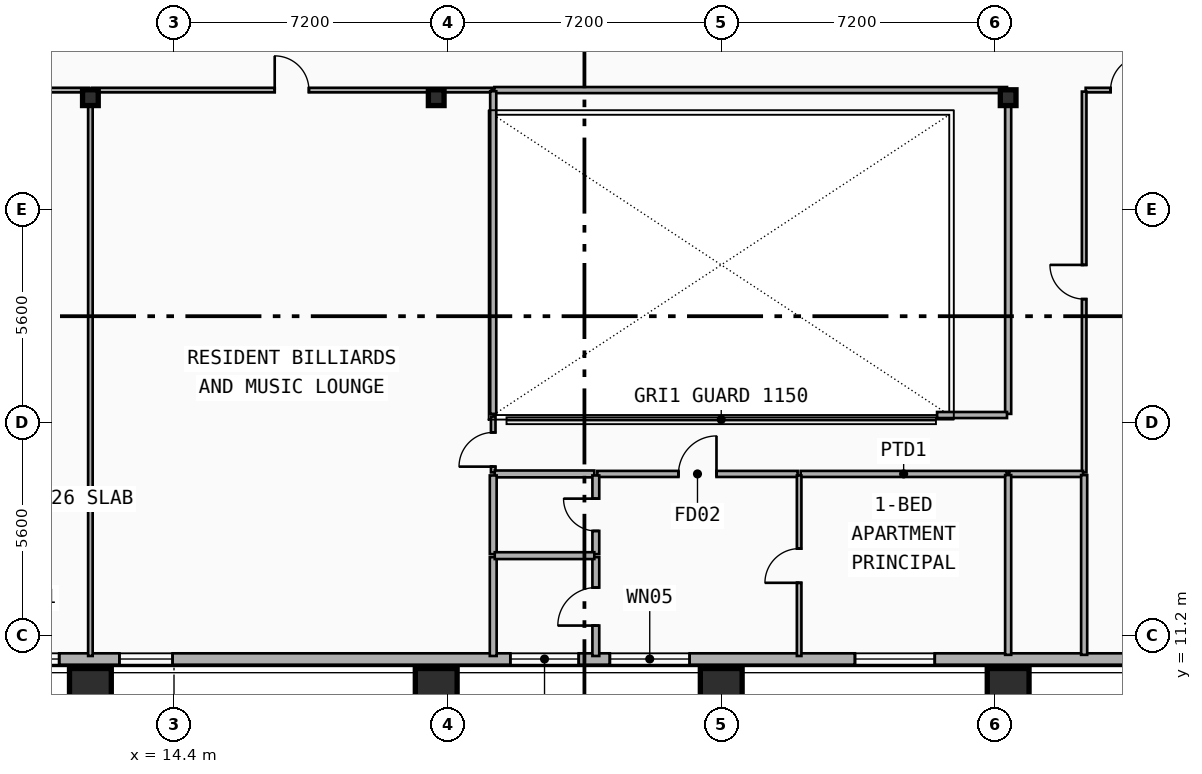
"""IFC4 building model, lengths in metres.
Left out: names, types, materials, properties, quantities, classifications, styles, units other than length and angle.
Written with IfcOpenShell. Run it as: python <this file> out.ifc"""

import sys

from ifc_helpers import new_model, si_unit, direction, frame, frame_2d, origin, origin_2d, place, context, subcontext, project, spatial, rectangle, i_section, extrude, element, fill, save


model = new_model("IFC4")
c1 = context("Model", 3, precision=1e-05, world=origin(), true_north=direction((0.0, 1.0)))
c2 = subcontext(c1, "Body", "Model", "MODEL_VIEW")
j1 = project(units=[si_unit("LENGTHUNIT", "METRE"), si_unit("PLANEANGLEUNIT", "RADIAN")], contexts=[c1])
p1 = place(None, origin())
s1 = spatial("IfcSite", under=j1, at=p1, CompositionType="ELEMENT")
p2 = place(p1, origin())
s2 = spatial("IfcBuilding", under=s1, at=p2, CompositionType="ELEMENT")
p3 = place(p2, frame((0.0, 0.0, 180.3)))
s3 = spatial("IfcBuildingStorey", under=s2, at=p3, CompositionType="ELEMENT", Elevation=180.3)
for number, where, z_axis, x_axis in (
    (1, (12.2, 25.35, 0.0), (0.0, 0.0, 1.0), (1.0, 0.0, 0.0)),
    (2, (21.3, 25.35, 0.0), (0.0, 0.0, 1.0), (1.0, 0.0, 0.0)),
    (3, (36.35, 25.35, 0.0), (0.0, 0.0, 1.0), (1.0, 0.0, 0.0)),
):
    element("IfcColumn", number, at=place(p3, frame(where, z_axis=z_axis, x_axis=x_axis)), inside=s3, PredefinedType="COLUMN", context=c2, shape_type="SweptSolid", body=[
        extrude(i_section(OverallWidth=0.413, OverallDepth=0.415, WebThickness=0.03, FlangeThickness=0.047, FilletRadius=0.015, at=origin_2d()), origin(), (0.0, 0.0, 1.0), 3.55),
    ])
for number, where, z_axis, x_axis in (
    (4, (12.2, 9.889, 0.0), (0.0, -0.09, 0.996), (1.0, 0.0, 0.0)),
    (5, (21.3, 9.889, 0.0), (0.0, -0.09, 0.996), (1.0, 0.0, 0.0)),
    (6, (28.8, 9.889, 0.0), (0.0, -0.09, 0.996), (1.0, 0.0, 0.0)),
    (7, (36.35, 9.889, 0.0), (0.0, -0.09, 0.996), (1.0, 0.0, 0.0)),
):
    element("IfcColumn", number, at=place(p3, frame(where, z_axis=z_axis, x_axis=x_axis)), inside=s3, PredefinedType="COLUMN", context=c2, shape_type="SweptSolid", body=[
        extrude(rectangle(XDim=1.1, YDim=1.1, at=origin_2d()), origin(), (0.0, 0.0, 1.0), 3.565),
    ])
p4 = place(p3, frame((48.0, 10.58, 0.0), z_axis=(0.0, 0.0, 1.0), x_axis=(-1.0, 0.0, 0.0)))
e8 = element("IfcWall", 8, at=p4, inside=s3, PredefinedType="SOLIDWALL", context=c2, shape_type="SweptSolid", body=[
    extrude(rectangle(XDim=38.4, YDim=0.3, at=frame_2d((19.2, 0.0))), origin(), (0.0, 0.0, 1.0), 3.29),
])
p5 = place(p4, frame((36.621, 0.0, 0.75)))
e9 = element("IfcOpeningElement", 9, at=p5, cuts=e8, PredefinedType="OPENING", context=c2, shape_type="SweptSolid", body=[
    extrude(rectangle(XDim=1.4, YDim=1.8, at=frame_2d((0.7, 0.9))), frame((0.0, 0.16, 0.0), z_axis=(0.0, -1.0, 0.0), x_axis=(1.0, 0.0, 0.0)), (0.0, 0.0, 1.0), 0.32),
])
p6 = place(p4, frame((33.637, 0.0, 0.34)))
e10 = element("IfcOpeningElement", 10, at=p6, cuts=e8, PredefinedType="OPENING", context=c2, shape_type="SweptSolid", body=[
    extrude(rectangle(XDim=1.4, YDim=1.8, at=frame_2d((0.7, 0.9))), frame((0.0, 0.16, 0.0), z_axis=(0.0, -1.0, 0.0), x_axis=(1.0, 0.0, 0.0)), (0.0, 0.0, 1.0), 0.32),
])
p7 = place(p4, frame((20.031, 0.0, 0.65)))
e11 = element("IfcOpeningElement", 11, at=p7, cuts=e8, PredefinedType="OPENING", context=c2, shape_type="SweptSolid", body=[
    extrude(rectangle(XDim=2.1, YDim=2.1, at=frame_2d((1.05, 1.05))), frame((0.0, 0.16, 0.0), z_axis=(0.0, -1.0, 0.0), x_axis=(1.0, 0.0, 0.0)), (0.0, 0.0, 1.0), 0.32),
])
p8 = place(p4, frame((22.95, 0.0, 0.8)))
e12 = element("IfcOpeningElement", 12, at=p8, cuts=e8, PredefinedType="OPENING", context=c2, shape_type="SweptSolid", body=[
    extrude(rectangle(XDim=1.8, YDim=1.8, at=frame_2d((0.9, 0.9))), frame((0.0, 0.16, 0.0), z_axis=(0.0, -1.0, 0.0), x_axis=(1.0, 0.0, 0.0)), (0.0, 0.0, 1.0), 0.32),
])
p9 = place(p4, frame((13.581, 0.0, 0.65)))
e13 = element("IfcOpeningElement", 13, at=p9, cuts=e8, PredefinedType="OPENING", context=c2, shape_type="SweptSolid", body=[
    extrude(rectangle(XDim=2.1, YDim=2.1, at=frame_2d((1.05, 1.05))), frame((0.0, 0.16, 0.0), z_axis=(0.0, -1.0, 0.0), x_axis=(1.0, 0.0, 0.0)), (0.0, 0.0, 1.0), 0.32),
])
p10 = place(p4, frame((3.363, 0.0, 1.05)))
e14 = element("IfcOpeningElement", 14, at=p10, cuts=e8, PredefinedType="OPENING", context=c2, shape_type="SweptSolid", body=[
    extrude(rectangle(XDim=1.2, YDim=1.5, at=frame_2d((0.6, 0.75))), frame((0.0, 0.16, 0.0), z_axis=(0.0, -1.0, 0.0), x_axis=(1.0, 0.0, 0.0)), (0.0, 0.0, 1.0), 0.32),
])
p11 = place(p3, frame((5.66, 25.55, 0.0), z_axis=(0.0, 0.0, 1.0), x_axis=(1.0, 0.0, 0.0)))
e15 = element("IfcWall", 15, at=p11, inside=s3, PredefinedType="PARTITIONING", context=c2, shape_type="SweptSolid", body=[
    extrude(rectangle(XDim=6.5, YDim=0.12, at=frame_2d((3.25, 0.0))), origin(), (0.0, 0.0, 1.0), 2.37),
])
p12 = place(p11, frame((2.8, 0.0, 0.0)))
e16 = element("IfcOpeningElement", 16, at=p12, cuts=e15, PredefinedType="OPENING", context=c2, shape_type="SweptSolid", body=[
    extrude(rectangle(XDim=0.9, YDim=2.1, at=frame_2d((0.45, 1.05))), frame((0.0, 0.07, 0.0), z_axis=(0.0, -1.0, 0.0), x_axis=(1.0, 0.0, 0.0)), (0.0, 0.0, 1.0), 0.14),
])
p13 = place(p3, frame((12.24, 25.55, 0.0), z_axis=(0.0, 0.0, 1.0), x_axis=(1.0, 0.0, 0.0)))
e17 = element("IfcWall", 17, at=p13, inside=s3, PredefinedType="PARTITIONING", context=c2, shape_type="SweptSolid", body=[
    extrude(rectangle(XDim=10.52, YDim=0.12, at=frame_2d((5.26, 0.0))), origin(), (0.0, 0.0, 1.0), 2.37),
])
p14 = place(p13, frame((4.81, 0.0, 0.0)))
e18 = element("IfcOpeningElement", 18, at=p14, cuts=e17, PredefinedType="OPENING", context=c2, shape_type="SweptSolid", body=[
    extrude(rectangle(XDim=0.9, YDim=2.1, at=frame_2d((0.45, 1.05))), frame((0.0, 0.07, 0.0), z_axis=(0.0, -1.0, 0.0), x_axis=(1.0, 0.0, 0.0)), (0.0, 0.0, 1.0), 0.14),
])
p15 = place(p3, frame((38.39, 25.55, 0.0), z_axis=(0.0, 0.0, 1.0), x_axis=(1.0, 0.0, 0.0)))
e19 = element("IfcWall", 19, at=p15, inside=s3, PredefinedType="PARTITIONING", context=c2, shape_type="SweptSolid", body=[
    extrude(rectangle(XDim=13.55, YDim=0.12, at=frame_2d((6.775, 0.0))), origin(), (0.0, 0.0, 1.0), 2.37),
])
p16 = place(p15, frame((0.656, 0.0, 0.0)))
e20 = element("IfcOpeningElement", 20, at=p16, cuts=e19, PredefinedType="OPENING", context=c2, shape_type="SweptSolid", body=[
    extrude(rectangle(XDim=0.9, YDim=2.1, at=frame_2d((0.45, 1.05))), frame((0.0, 0.07, 0.0), z_axis=(0.0, -1.0, 0.0), x_axis=(1.0, 0.0, 0.0)), (0.0, 0.0, 1.0), 0.14),
])
p17 = place(p3, frame((38.35, 15.49, 0.0), z_axis=(0.0, 0.0, 1.0), x_axis=(0.0, 1.0, 0.0)))
e21 = element("IfcWall", 21, at=p17, inside=s3, PredefinedType="PARTITIONING", context=c2, shape_type="SweptSolid", body=[
    extrude(rectangle(XDim=10.02, YDim=0.12, at=frame_2d((5.01, 0.0))), origin(), (0.0, 0.0, 1.0), 2.82),
])
p18 = place(p17, frame((4.56, 0.0, 0.0)))
e22 = element("IfcOpeningElement", 22, at=p18, cuts=e21, PredefinedType="OPENING", context=c2, shape_type="SweptSolid", body=[
    extrude(rectangle(XDim=0.9, YDim=2.1, at=frame_2d((0.45, 1.05))), frame((0.0, 0.07, 0.0), z_axis=(0.0, -1.0, 0.0), x_axis=(1.0, 0.0, 0.0)), (0.0, 0.0, 1.0), 0.14),
])
p19 = place(p3, frame((22.8, 15.49, 0.0), z_axis=(0.0, 0.0, 1.0), x_axis=(0.0, 1.0, 0.0)))
e23 = element("IfcWall", 23, at=p19, inside=s3, PredefinedType="PARTITIONING", context=c2, shape_type="SweptSolid", body=[
    extrude(rectangle(XDim=1.47, YDim=0.12, at=frame_2d((0.735, 0.0))), origin(), (0.0, 0.0, 1.0), 2.73),
])
p20 = place(p19, frame((0.152, 0.0, 0.0)))
e24 = element("IfcOpeningElement", 24, at=p20, cuts=e23, PredefinedType="OPENING", context=c2, shape_type="SweptSolid", body=[
    extrude(rectangle(XDim=0.9, YDim=2.1, at=frame_2d((0.45, 1.05))), frame((0.0, 0.07, 0.0), z_axis=(0.0, -1.0, 0.0), x_axis=(1.0, 0.0, 0.0)), (0.0, 0.0, 1.0), 0.14),
])
p21 = place(p3, frame((25.54, 15.45, 0.0), z_axis=(0.0, 0.0, 1.0), x_axis=(1.0, 0.0, 0.0)))
e25 = element("IfcWall", 25, at=p21, inside=s3, PredefinedType="PARTITIONING", context=c2, shape_type="SweptSolid", body=[
    extrude(rectangle(XDim=5.27, YDim=0.16, at=frame_2d((2.635, 0.0))), origin(), (0.0, 0.0, 1.0), 2.37),
])
p22 = place(p21, frame((2.135, 0.0, 0.0)))
e26 = element("IfcOpeningElement", 26, at=p22, cuts=e25, PredefinedType="OPENING", context=c2, shape_type="SweptSolid", body=[
    extrude(rectangle(XDim=1.0, YDim=2.15, at=frame_2d((0.5, 1.075))), frame((0.0, 0.09, 0.0), z_axis=(0.0, -1.0, 0.0), x_axis=(1.0, 0.0, 0.0)), (0.0, 0.0, 1.0), 0.18),
])
p23 = place(p3, frame((22.84, 15.45, 0.0), z_axis=(0.0, 0.0, 1.0), x_axis=(1.0, 0.0, 0.0)))
e27 = element("IfcWall", 27, at=p23, inside=s3, PredefinedType="PLUMBINGWALL", context=c2, shape_type="SweptSolid", body=[
    extrude(rectangle(XDim=2.62, YDim=0.18, at=frame_2d((1.31, 0.0))), origin(), (0.0, 0.0, 1.0), 3.29),
])
p24 = place(p3, frame((30.89, 15.45, 0.0), z_axis=(0.0, 0.0, 1.0), x_axis=(1.0, 0.0, 0.0)))
e28 = element("IfcWall", 28, at=p24, inside=s3, PredefinedType="PARTITIONING", context=c2, shape_type="SweptSolid", body=[
    extrude(rectangle(XDim=5.42, YDim=0.16, at=frame_2d((2.71, 0.0))), origin(), (0.0, 0.0, 1.0), 2.37),
])
p25 = place(p3, frame((12.2, 10.66, 0.0), z_axis=(0.0, 0.0, 1.0), x_axis=(0.0, 1.0, 0.0)))
e29 = element("IfcWall", 29, at=p25, inside=s3, PredefinedType="PARTITIONING", context=c2, shape_type="SweptSolid", body=[
    extrude(rectangle(XDim=14.85, YDim=0.12, at=frame_2d((7.425, 0.0))), origin(), (0.0, 0.0, 1.0), 2.37),
])
p26 = place(p3, frame((22.8, 10.66, 0.0), z_axis=(0.0, 0.0, 1.0), x_axis=(0.0, 1.0, 0.0)))
e30 = element("IfcWall", 30, at=p26, inside=s3, PredefinedType="PLUMBINGWALL", context=c2, shape_type="SweptSolid", body=[
    extrude(rectangle(XDim=2.6, YDim=0.18, at=frame_2d((1.3, 0.0))), origin(), (0.0, 0.0, 1.0), 2.97),
])
p27 = place(p3, frame((22.8, 13.34, 0.0), z_axis=(0.0, 0.0, 1.0), x_axis=(0.0, 1.0, 0.0)))
e31 = element("IfcWall", 31, at=p27, inside=s3, PredefinedType="PLUMBINGWALL", context=c2, shape_type="SweptSolid", body=[
    extrude(rectangle(XDim=2.07, YDim=0.18, at=frame_2d((1.035, 0.0))), origin(), (0.0, 0.0, 1.0), 2.97),
])
p28 = place(p3, frame((25.5, 10.66, 0.0), z_axis=(0.0, 0.0, 1.0), x_axis=(0.0, 1.0, 0.0)))
e32 = element("IfcWall", 32, at=p28, inside=s3, PredefinedType="PLUMBINGWALL", context=c2, shape_type="SweptSolid", body=[
    extrude(rectangle(XDim=2.6, YDim=0.18, at=frame_2d((1.3, 0.0))), origin(), (0.0, 0.0, 1.0), 2.97),
])
p29 = place(p28, frame((0.8, 0.0, 0.0)))
e33 = element("IfcOpeningElement", 33, at=p29, cuts=e32, PredefinedType="OPENING", context=c2, shape_type="SweptSolid", body=[
    extrude(rectangle(XDim=1.0, YDim=2.15, at=frame_2d((0.5, 1.075))), frame((0.0, 0.1, 0.0), z_axis=(0.0, -1.0, 0.0), x_axis=(1.0, 0.0, 0.0)), (0.0, 0.0, 1.0), 0.2),
])
p30 = place(p3, frame((25.5, 13.34, 0.0), z_axis=(0.0, 0.0, 1.0), x_axis=(0.0, 1.0, 0.0)))
e34 = element("IfcWall", 34, at=p30, inside=s3, PredefinedType="PLUMBINGWALL", context=c2, shape_type="SweptSolid", body=[
    extrude(rectangle(XDim=2.07, YDim=0.18, at=frame_2d((1.035, 0.0))), origin(), (0.0, 0.0, 1.0), 2.97),
])
p31 = place(p30, frame((0.61, 0.0, 0.0)))
e35 = element("IfcOpeningElement", 35, at=p31, cuts=e34, PredefinedType="OPENING", context=c2, shape_type="SweptSolid", body=[
    extrude(rectangle(XDim=0.85, YDim=2.1, at=frame_2d((0.425, 1.05))), frame((0.0, 0.1, 0.0), z_axis=(0.0, -1.0, 0.0), x_axis=(1.0, 0.0, 0.0)), (0.0, 0.0, 1.0), 0.2),
])
p32 = place(p3, frame((30.85, 10.66, 0.0), z_axis=(0.0, 0.0, 1.0), x_axis=(0.0, 1.0, 0.0)))
e36 = element("IfcWall", 36, at=p32, inside=s3, PredefinedType="PARTITIONING", context=c2, shape_type="SweptSolid", body=[
    extrude(rectangle(XDim=4.75, YDim=0.12, at=frame_2d((2.375, 0.0))), origin(), (0.0, 0.0, 1.0), 2.97),
])
p33 = place(p32, frame((1.925, 0.0, 0.0)))
e37 = element("IfcOpeningElement", 37, at=p33, cuts=e36, PredefinedType="OPENING", context=c2, shape_type="SweptSolid", body=[
    extrude(rectangle(XDim=0.9, YDim=2.1, at=frame_2d((0.45, 1.05))), frame((0.0, 0.07, 0.0), z_axis=(0.0, -1.0, 0.0), x_axis=(1.0, 0.0, 0.0)), (0.0, 0.0, 1.0), 0.14),
])
p34 = place(p3, frame((22.84, 13.3, 0.0), z_axis=(0.0, 0.0, 1.0), x_axis=(1.0, 0.0, 0.0)))
e38 = element("IfcWall", 38, at=p34, inside=s3, PredefinedType="PLUMBINGWALL", context=c2, shape_type="SweptSolid", body=[
    extrude(rectangle(XDim=2.62, YDim=0.18, at=frame_2d((1.31, 0.0))), origin(), (0.0, 0.0, 1.0), 2.97),
])
p35 = place(p3, frame((22.83, 25.55, 0.0), z_axis=(0.0, 0.0, 1.0), x_axis=(1.0, 0.0, 0.0)))
e39 = element("IfcWall", 39, at=p35, inside=s3, PredefinedType="PARTITIONING", context=c2, shape_type="SweptSolid", body=[
    extrude(rectangle(XDim=13.49, YDim=0.16, at=frame_2d((6.745, 0.0))), origin(), (0.0, 0.0, 1.0), 2.37),
])
p36 = place(p3, frame((36.38, 15.45, 0.0), z_axis=(0.0, 0.0, 1.0), x_axis=(1.0, 0.0, 0.0)))
e40 = element("IfcWall", 40, at=p36, inside=s3, PredefinedType="PARTITIONING", context=c2, shape_type="SweptSolid", body=[
    extrude(rectangle(XDim=1.94, YDim=0.16, at=frame_2d((0.97, 0.0))), origin(), (0.0, 0.0, 1.0), 2.37),
])
p37 = place(p3, frame((36.35, 17.03, 0.0), z_axis=(0.0, 0.0, 1.0), x_axis=(0.0, 1.0, 0.0)))
e41 = element("IfcWall", 41, at=p37, inside=s3, PredefinedType="PARTITIONING", context=c2, shape_type="SweptSolid", body=[
    extrude(rectangle(XDim=8.49, YDim=0.16, at=frame_2d((4.245, 0.0))), origin(), (0.0, 0.0, 1.0), 2.37),
])
p38 = place(p3, frame((34.48, 17.0, 0.0), z_axis=(0.0, 0.0, 1.0), x_axis=(1.0, 0.0, 0.0)))
e42 = element("IfcWall", 42, at=p38, inside=s3, PredefinedType="PARTITIONING", context=c2, shape_type="SweptSolid", body=[
    extrude(rectangle(XDim=1.84, YDim=0.16, at=frame_2d((0.92, 0.0))), origin(), (0.0, 0.0, 1.0), 2.37),
])
p39 = place(p3, frame((22.8, 17.03, 0.0), z_axis=(0.0, 0.0, 1.0), x_axis=(0.0, 1.0, 0.0)))
e43 = element("IfcWall", 43, at=p39, inside=s3, PredefinedType="PARTITIONING", context=c2, shape_type="SweptSolid", body=[
    extrude(rectangle(XDim=8.49, YDim=0.16, at=frame_2d((4.245, 0.0))), origin(), (0.0, 0.0, 1.0), 2.73),
])
p40 = place(p3, frame((36.35, 10.69, 0.0), z_axis=(0.0, 0.0, 1.0), x_axis=(0.0, 1.0, 0.0)))
e44 = element("IfcWall", 44, at=p40, inside=s3, PredefinedType="PARTITIONING", context=c2, shape_type="SweptSolid", body=[
    extrude(rectangle(XDim=4.73, YDim=0.16, at=frame_2d((2.365, 0.0))), origin(), (0.0, 0.0, 1.0), 2.37),
])
p41 = place(p3, frame((38.35, 10.69, 0.0), z_axis=(0.0, 0.0, 1.0), x_axis=(0.0, 1.0, 0.0)))
e45 = element("IfcWall", 45, at=p41, inside=s3, PredefinedType="PARTITIONING", context=c2, shape_type="SweptSolid", body=[
    extrude(rectangle(XDim=4.73, YDim=0.16, at=frame_2d((2.365, 0.0))), origin(), (0.0, 0.0, 1.0), 2.96),
])
p42 = place(p5, origin())
e46 = element("IfcWindow", 46, at=p42, inside=s3, PartitioningType="SINGLE_PANEL", PredefinedType="WINDOW", context=c2, shape_type="SweptSolid", body=[
    extrude(rectangle(XDim=1.4, YDim=1.8, at=frame_2d((0.7, 0.9))), frame((0.0, 0.03, 0.0), z_axis=(0.0, -1.0, 0.0), x_axis=(1.0, 0.0, 0.0)), (0.0, 0.0, 1.0), 0.06),
])
fill(e9, e46)
p43 = place(p6, origin())
e47 = element("IfcWindow", 47, at=p43, inside=s3, PartitioningType="SINGLE_PANEL", PredefinedType="WINDOW", context=c2, shape_type="SweptSolid", body=[
    extrude(rectangle(XDim=1.4, YDim=1.8, at=frame_2d((0.7, 0.9))), frame((0.0, 0.03, 0.0), z_axis=(0.0, -1.0, 0.0), x_axis=(1.0, 0.0, 0.0)), (0.0, 0.0, 1.0), 0.06),
])
fill(e10, e47)
p44 = place(p7, origin())
e48 = element("IfcWindow", 48, at=p44, inside=s3, PartitioningType="SINGLE_PANEL", PredefinedType="WINDOW", context=c2, shape_type="SweptSolid", body=[
    extrude(rectangle(XDim=2.1, YDim=2.1, at=frame_2d((1.05, 1.05))), frame((0.0, 0.03, 0.0), z_axis=(0.0, -1.0, 0.0), x_axis=(1.0, 0.0, 0.0)), (0.0, 0.0, 1.0), 0.06),
])
fill(e11, e48)
p45 = place(p8, origin())
e49 = element("IfcWindow", 49, at=p45, inside=s3, PartitioningType="SINGLE_PANEL", PredefinedType="WINDOW", context=c2, shape_type="SweptSolid", body=[
    extrude(rectangle(XDim=1.8, YDim=1.8, at=frame_2d((0.9, 0.9))), frame((0.0, 0.03, 0.0), z_axis=(0.0, -1.0, 0.0), x_axis=(1.0, 0.0, 0.0)), (0.0, 0.0, 1.0), 0.06),
])
fill(e12, e49)
p46 = place(p9, origin())
e50 = element("IfcWindow", 50, at=p46, inside=s3, PartitioningType="SINGLE_PANEL", PredefinedType="WINDOW", context=c2, shape_type="SweptSolid", body=[
    extrude(rectangle(XDim=2.1, YDim=2.1, at=frame_2d((1.05, 1.05))), frame((0.0, 0.03, 0.0), z_axis=(0.0, -1.0, 0.0), x_axis=(1.0, 0.0, 0.0)), (0.0, 0.0, 1.0), 0.06),
])
fill(e13, e50)
p47 = place(p14, origin())
e51 = element("IfcDoor", 51, at=p47, inside=s3, OperationType="SINGLE_SWING_LEFT", PredefinedType="DOOR", context=c2, shape_type="SweptSolid", body=[
    extrude(rectangle(XDim=0.9, YDim=2.1, at=frame_2d((0.45, 1.05))), frame((0.0, 0.025, 0.0), z_axis=(0.0, -1.0, 0.0), x_axis=(1.0, 0.0, 0.0)), (0.0, 0.0, 1.0), 0.05),
])
fill(e18, e51)
p48 = place(p16, origin())
e52 = element("IfcDoor", 52, at=p48, inside=s3, OperationType="SINGLE_SWING_RIGHT", PredefinedType="DOOR", context=c2, shape_type="SweptSolid", body=[
    extrude(rectangle(XDim=0.9, YDim=2.1, at=frame_2d((0.45, 1.05))), frame((0.0, 0.025, 0.0), z_axis=(0.0, -1.0, 0.0), x_axis=(1.0, 0.0, 0.0)), (0.0, 0.0, 1.0), 0.05),
])
fill(e20, e52)
p49 = place(p18, origin())
e53 = element("IfcDoor", 53, at=p49, inside=s3, OperationType="SINGLE_SWING_RIGHT", PredefinedType="DOOR", context=c2, shape_type="SweptSolid", body=[
    extrude(rectangle(XDim=0.9, YDim=2.1, at=frame_2d((0.45, 1.05))), frame((0.0, 0.025, 0.0), z_axis=(0.0, -1.0, 0.0), x_axis=(1.0, 0.0, 0.0)), (0.0, 0.0, 1.0), 0.05),
])
fill(e22, e53)
p50 = place(p20, origin())
e54 = element("IfcDoor", 54, at=p50, inside=s3, OperationType="SINGLE_SWING_LEFT", PredefinedType="DOOR", context=c2, shape_type="SweptSolid", body=[
    extrude(rectangle(XDim=0.9, YDim=2.1, at=frame_2d((0.45, 1.05))), frame((0.0, 0.025, 0.0), z_axis=(0.0, -1.0, 0.0), x_axis=(1.0, 0.0, 0.0)), (0.0, 0.0, 1.0), 0.05),
])
fill(e24, e54)
p51 = place(p22, origin())
e55 = element("IfcDoor", 55, at=p51, inside=s3, OperationType="SINGLE_SWING_RIGHT", PredefinedType="DOOR", context=c2, shape_type="SweptSolid", body=[
    extrude(rectangle(XDim=1.0, YDim=2.15, at=frame_2d((0.5, 1.075))), frame((0.0, 0.025, 0.0), z_axis=(0.0, -1.0, 0.0), x_axis=(1.0, 0.0, 0.0)), (0.0, 0.0, 1.0), 0.05),
])
fill(e26, e55)
p52 = place(p29, origin())
e56 = element("IfcDoor", 56, at=p52, inside=s3, OperationType="SINGLE_SWING_LEFT", PredefinedType="DOOR", context=c2, shape_type="SweptSolid", body=[
    extrude(rectangle(XDim=1.0, YDim=2.15, at=frame_2d((0.5, 1.075))), frame((0.0, 0.025, 0.0), z_axis=(0.0, -1.0, 0.0), x_axis=(1.0, 0.0, 0.0)), (0.0, 0.0, 1.0), 0.05),
])
fill(e33, e56)
p53 = place(p31, origin())
e57 = element("IfcDoor", 57, at=p53, inside=s3, OperationType="SINGLE_SWING_RIGHT", PredefinedType="DOOR", context=c2, shape_type="SweptSolid", body=[
    extrude(rectangle(XDim=0.85, YDim=2.1, at=frame_2d((0.425, 1.05))), frame((0.0, 0.025, 0.0), z_axis=(0.0, -1.0, 0.0), x_axis=(1.0, 0.0, 0.0)), (0.0, 0.0, 1.0), 0.05),
])
fill(e35, e57)
p54 = place(p33, origin())
e58 = element("IfcDoor", 58, at=p54, inside=s3, OperationType="SINGLE_SWING_LEFT", PredefinedType="DOOR", context=c2, shape_type="SweptSolid", body=[
    extrude(rectangle(XDim=0.9, YDim=2.1, at=frame_2d((0.45, 1.05))), frame((0.0, 0.025, 0.0), z_axis=(0.0, -1.0, 0.0), x_axis=(1.0, 0.0, 0.0)), (0.0, 0.0, 1.0), 0.05),
])
fill(e37, e58)
save(model, sys.argv[1])
